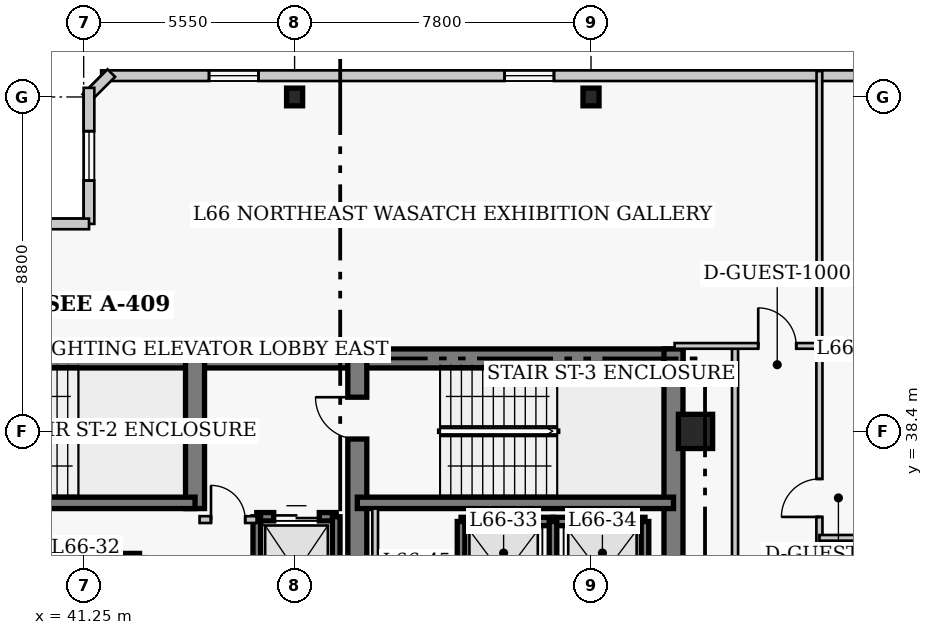
"""IFC4 building model, lengths in metres.
Left out: names, types, materials, properties, quantities, classifications, styles, units other than length and angle.
Written with IfcOpenShell. Run it as: python <this file> out.ifc"""

import sys

from ifc_helpers import new_model, si_unit, direction, frame, frame_2d, origin, origin_2d, place, context, subcontext, project, spatial, rectangle, i_section, extrude, element, fill, save


model = new_model("IFC4")
c1 = context("Model", 3, precision=1e-05, world=origin(), true_north=direction((0.0, 1.0)))
c2 = subcontext(c1, "Body", "Model", "MODEL_VIEW")
j1 = project(units=[si_unit("LENGTHUNIT", "METRE"), si_unit("PLANEANGLEUNIT", "RADIAN")], contexts=[c1])
p1 = place(None, origin())
s1 = spatial("IfcSite", under=j1, at=p1, CompositionType="ELEMENT")
p2 = place(p1, origin())
s2 = spatial("IfcBuilding", under=s1, at=p2, CompositionType="ELEMENT")
p3 = place(p2, frame((0.0, 0.0, 265.4)))
s3 = spatial("IfcBuildingStorey", under=s2, at=p3, CompositionType="ELEMENT", Elevation=265.4)
p4 = place(p3, frame((35.85, 40.32, 0.0), z_axis=(0.0, 0.0, 1.0), x_axis=(1.0, 0.0, 0.0)))
e1 = element("IfcWall", 1, at=p4, inside=s3, PredefinedType="SHEAR", context=c2, shape_type="SweptSolid", body=[
    extrude(rectangle(XDim=12.6, YDim=0.5, at=frame_2d((6.3, 0.0))), origin(), (0.0, 0.0, 1.0), 4.0),
])
p5 = place(p3, frame((48.45, 40.32, 0.0), z_axis=(0.0, 0.0, 1.0), x_axis=(1.0, 0.0, 0.0)))
e2 = element("IfcWall", 2, at=p5, inside=s3, PredefinedType="SHEAR", context=c2, shape_type="SweptSolid", body=[
    extrude(rectangle(XDim=8.57, YDim=0.5, at=frame_2d((4.285, 0.0))), origin(), (0.0, 0.0, 1.0), 4.0),
])
p6 = place(p3, frame((56.77, 27.05, 0.0), z_axis=(0.0, 0.0, 1.0), x_axis=(0.0, 1.0, 0.0)))
e3 = element("IfcWall", 3, at=p6, inside=s3, PredefinedType="SHEAR", context=c2, shape_type="SweptSolid", body=[
    extrude(rectangle(XDim=13.52, YDim=0.5, at=frame_2d((6.76, 0.0))), origin(), (0.0, 0.0, 1.0), 4.0),
])
p7 = place(p3, frame((44.18, 36.37, 0.0), z_axis=(0.0, 0.0, 1.0), x_axis=(0.0, 1.0, 0.0)))
e4 = element("IfcWall", 4, at=p7, inside=s3, PredefinedType="SHEAR", context=c2, shape_type="SweptSolid", body=[
    extrude(rectangle(XDim=3.95, YDim=0.5, at=frame_2d((1.975, 0.0))), origin(), (0.0, 0.0, 1.0), 4.0),
])
p8 = place(p3, frame((48.45, 32.5, 0.0), z_axis=(0.0, 0.0, 1.0), x_axis=(0.0, 1.0, 0.0)))
e5 = element("IfcWall", 5, at=p8, inside=s3, PredefinedType="SHEAR", context=c2, shape_type="SweptSolid", body=[
    extrude(rectangle(XDim=7.82, YDim=0.5, at=frame_2d((3.91, 0.0))), origin(), (0.0, 0.0, 1.0), 4.0),
])
p9 = place(p8, frame((5.7, 0.0, 0.0)))
e6 = element("IfcOpeningElement", 6, at=p9, cuts=e5, PredefinedType="OPENING", context=c2, shape_type="SweptSolid", body=[
    extrude(rectangle(XDim=1.1, YDim=2.15, at=frame_2d((0.55, 1.075))), frame((0.0, 0.26, 0.0), z_axis=(0.0, -1.0, 0.0), x_axis=(1.0, 0.0, 0.0)), (0.0, 0.0, 1.0), 0.52),
])
p10 = place(p3, frame((35.85, 36.52, 0.0), z_axis=(0.0, 0.0, 1.0), x_axis=(1.0, 0.0, 0.0)))
e7 = element("IfcWall", 7, at=p10, inside=s3, PredefinedType="SHEAR", context=c2, shape_type="SweptSolid", body=[
    extrude(rectangle(XDim=8.33, YDim=0.3, at=frame_2d((4.165, 0.0))), origin(), (0.0, 0.0, 1.0), 4.0),
])
p11 = place(p3, frame((48.45, 36.52, 0.0), z_axis=(0.0, 0.0, 1.0), x_axis=(1.0, 0.0, 0.0)))
e8 = element("IfcWall", 8, at=p11, inside=s3, PredefinedType="SHEAR", context=c2, shape_type="SweptSolid", body=[
    extrude(rectangle(XDim=8.32, YDim=0.3, at=frame_2d((4.16, 0.0))), origin(), (0.0, 0.0, 1.0), 4.0),
])
for number, where, z_axis, x_axis in (
    (9, (46.8, 47.2, 0.0), (0.0, 0.0, 1.0), (1.0, 0.0, 0.0)),
    (10, (54.6, 47.2, 0.0), (0.0, 0.0, 1.0), (1.0, 0.0, 0.0)),
):
    element("IfcColumn", number, at=place(p3, frame(where, z_axis=z_axis, x_axis=x_axis)), inside=s3, PredefinedType="COLUMN", context=c2, shape_type="SweptSolid", body=[
        extrude(i_section(OverallWidth=0.422, OverallDepth=0.465, WebThickness=0.045, FlangeThickness=0.073, FilletRadius=0.017, at=origin_2d()), origin(), (0.0, 0.0, 1.0), 4.0),
    ])
p12 = place(p3, frame((57.35, 38.4, 0.0), z_axis=(0.0, 0.0, 1.0), x_axis=(1.0, 0.0, 0.0)))
e11 = element("IfcColumn", 11, at=p12, inside=s3, PredefinedType="COLUMN", context=c2, shape_type="SweptSolid", body=[
    extrude(rectangle(XDim=0.9, YDim=0.9, at=origin_2d()), origin(), (0.0, 0.0, 1.0), 4.0),
])
p13 = place(p3, frame((66.54, 47.76, 0.0), z_axis=(0.0, 0.0, 1.0), x_axis=(-1.0, 0.0, 0.0)))
e12 = element("IfcWall", 12, at=p13, inside=s3, PredefinedType="SOLIDWALL", context=c2, shape_type="SweptSolid", body=[
    extrude(rectangle(XDim=24.83, YDim=0.28, at=frame_2d((12.415, 0.0))), origin(), (0.0, 0.0, 1.0), 3.76),
])
p14 = place(p13, frame((3.488, 0.0, 0.85)))
e13 = element("IfcOpeningElement", 13, at=p14, cuts=e12, PredefinedType="OPENING", context=c2, shape_type="SweptSolid", body=[
    extrude(rectangle(XDim=1.3, YDim=1.7, at=frame_2d((0.65, 0.85))), frame((0.0, 0.15, 0.0), z_axis=(0.0, -1.0, 0.0), x_axis=(1.0, 0.0, 0.0)), (0.0, 0.0, 1.0), 0.3),
])
p15 = place(p13, frame((12.915, 0.0, 0.85)))
e14 = element("IfcOpeningElement", 14, at=p15, cuts=e12, PredefinedType="OPENING", context=c2, shape_type="SweptSolid", body=[
    extrude(rectangle(XDim=1.3, YDim=1.7, at=frame_2d((0.65, 0.85))), frame((0.0, 0.15, 0.0), z_axis=(0.0, -1.0, 0.0), x_axis=(1.0, 0.0, 0.0)), (0.0, 0.0, 1.0), 0.3),
])
p16 = place(p13, frame((20.692, 0.0, 0.85)))
e15 = element("IfcOpeningElement", 15, at=p16, cuts=e12, PredefinedType="OPENING", context=c2, shape_type="SweptSolid", body=[
    extrude(rectangle(XDim=1.3, YDim=1.7, at=frame_2d((0.65, 0.85))), frame((0.0, 0.15, 0.0), z_axis=(0.0, -1.0, 0.0), x_axis=(1.0, 0.0, 0.0)), (0.0, 0.0, 1.0), 0.3),
])
p17 = place(p3, frame((41.977, 47.829, 0.0), z_axis=(0.0, 0.0, 1.0), x_axis=(-0.706975312048, -0.707238225886, 0.0)))
e16 = element("IfcWall", 16, at=p17, inside=s3, PredefinedType="SOLIDWALL", context=c2, shape_type="SweptSolid", body=[
    extrude(rectangle(XDim=0.929, YDim=0.28, at=frame_2d((0.464, 0.0))), origin(), (0.0, 0.0, 1.0), 3.76),
])
p18 = place(p3, frame((41.39, 47.44, 0.0), z_axis=(0.0, 0.0, 1.0), x_axis=(0.0, -1.0, 0.0)))
e17 = element("IfcWall", 17, at=p18, inside=s3, PredefinedType="SOLIDWALL", context=c2, shape_type="SweptSolid", body=[
    extrude(rectangle(XDim=3.58, YDim=0.28, at=frame_2d((1.79, 0.0))), origin(), (0.0, 0.0, 1.0), 3.76),
])
p19 = place(p18, frame((1.14, 0.0, 0.85)))
e18 = element("IfcOpeningElement", 18, at=p19, cuts=e17, PredefinedType="OPENING", context=c2, shape_type="SweptSolid", body=[
    extrude(rectangle(XDim=1.3, YDim=1.7, at=frame_2d((0.65, 0.85))), frame((0.0, 0.15, 0.0), z_axis=(0.0, -1.0, 0.0), x_axis=(1.0, 0.0, 0.0)), (0.0, 0.0, 1.0), 0.3),
])
p20 = place(p3, frame((41.39, 43.86, 0.0), z_axis=(0.0, 0.0, 1.0), x_axis=(-1.0, 0.0, 0.0)))
e19 = element("IfcWall", 19, at=p20, inside=s3, PredefinedType="SOLIDWALL", context=c2, shape_type="SweptSolid", body=[
    extrude(rectangle(XDim=4.78, YDim=0.28, at=frame_2d((2.39, 0.0))), origin(), (0.0, 0.0, 1.0), 3.76),
])
p21 = place(p20, frame((1.74, 0.0, 0.85)))
e20 = element("IfcOpeningElement", 20, at=p21, cuts=e19, PredefinedType="OPENING", context=c2, shape_type="SweptSolid", body=[
    extrude(rectangle(XDim=1.3, YDim=1.7, at=frame_2d((0.65, 0.85))), frame((0.0, 0.15, 0.0), z_axis=(0.0, -1.0, 0.0), x_axis=(1.0, 0.0, 0.0)), (0.0, 0.0, 1.0), 0.3),
])
p22 = place(p3, frame((40.4, 35.08, 0.0), z_axis=(0.0, 0.0, 1.0), x_axis=(1.0, 0.0, 0.0)))
e21 = element("IfcWall", 21, at=p22, inside=s3, PredefinedType="SHEAR", context=c2, shape_type="SweptSolid", body=[
    extrude(rectangle(XDim=2.32, YDim=0.22, at=frame_2d((1.16, 0.0))), origin(), (0.0, 0.0, 1.0), 4.0),
])
p23 = place(p3, frame((51.18, 36.03, 0.0), z_axis=(0.0, 0.0, 1.0), x_axis=(1.0, 0.0, 0.0)))
e22 = element("IfcWall", 22, at=p23, inside=s3, PredefinedType="SHEAR", context=c2, shape_type="SweptSolid", body=[
    extrude(rectangle(XDim=2.42, YDim=0.22, at=frame_2d((1.21, 0.0))), origin(), (0.0, 0.0, 1.0), 4.0),
])
p24 = place(p3, frame((51.18, 33.17, 0.0), z_axis=(0.0, 0.0, 1.0), x_axis=(0.0, 1.0, 0.0)))
e23 = element("IfcWall", 23, at=p24, inside=s3, PredefinedType="SHEAR", context=c2, shape_type="SweptSolid", body=[
    extrude(rectangle(XDim=2.86, YDim=0.2, at=frame_2d((1.43, 0.0))), origin(), (0.0, 0.0, 1.0), 4.0),
])
p25 = place(p3, frame((53.6, 36.03, 0.0), z_axis=(0.0, 0.0, 1.0), x_axis=(1.0, 0.0, 0.0)))
e24 = element("IfcWall", 24, at=p25, inside=s3, PredefinedType="SHEAR", context=c2, shape_type="SweptSolid", body=[
    extrude(rectangle(XDim=2.42, YDim=0.22, at=frame_2d((1.21, 0.0))), origin(), (0.0, 0.0, 1.0), 4.0),
])
for number, where, z_axis, x_axis in (
    (25, (53.6, 33.17, 0.0), (0.0, 0.0, 1.0), (0.0, 1.0, 0.0)),
    (26, (56.02, 33.17, 0.0), (0.0, 0.0, 1.0), (0.0, 1.0, 0.0)),
):
    element("IfcWall", number, at=place(p3, frame(where, z_axis=z_axis, x_axis=x_axis)), inside=s3, PredefinedType="SHEAR", context=c2, shape_type="SweptSolid", body=[
        extrude(rectangle(XDim=2.86, YDim=0.2, at=frame_2d((1.43, 0.0))), origin(), (0.0, 0.0, 1.0), 4.0),
    ])
p26 = place(p3, frame((45.805, 36.155, 0.0), z_axis=(0.0, 0.0, 1.0), x_axis=(1.0, 0.0, 0.0)))
e27 = element("IfcWall", 27, at=p26, inside=s3, PredefinedType="SHEAR", context=c2, shape_type="SweptSolid", body=[
    extrude(rectangle(XDim=2.09, YDim=0.22, at=frame_2d((1.045, 0.0))), origin(), (0.0, 0.0, 1.0), 4.0),
])
p27 = place(p26, frame((0.445, 0.0, 0.0)))
e28 = element("IfcOpeningElement", 28, at=p27, cuts=e27, PredefinedType="OPENING", context=c2, shape_type="SweptSolid", body=[
    extrude(rectangle(XDim=1.2, YDim=2.15, at=frame_2d((0.6, 1.075))), frame((0.0, 0.12, 0.0), z_axis=(0.0, -1.0, 0.0), x_axis=(1.0, 0.0, 0.0)), (0.0, 0.0, 1.0), 0.24),
])
p28 = place(p3, frame((45.805, 32.65, 0.0), z_axis=(0.0, 0.0, 1.0), x_axis=(0.0, 1.0, 0.0)))
e29 = element("IfcWall", 29, at=p28, inside=s3, PredefinedType="SHEAR", context=c2, shape_type="SweptSolid", body=[
    extrude(rectangle(XDim=3.505, YDim=0.2, at=frame_2d((1.752, 0.0))), origin(), (0.0, 0.0, 1.0), 4.0),
])
p29 = place(p3, frame((47.895, 33.245, 0.0), z_axis=(0.0, 0.0, 1.0), x_axis=(0.0, 1.0, 0.0)))
e30 = element("IfcWall", 30, at=p29, inside=s3, PredefinedType="SHEAR", context=c2, shape_type="SweptSolid", body=[
    extrude(rectangle(XDim=2.91, YDim=0.2, at=frame_2d((1.455, 0.0))), origin(), (0.0, 0.0, 1.0), 4.0),
])
p30 = place(p3, frame((44.3, 36.08, 0.0), z_axis=(0.0, 0.0, 1.0), x_axis=(1.0, 0.0, 0.0)))
e31 = element("IfcWall", 31, at=p30, inside=s3, PredefinedType="PARTITIONING", context=c2, shape_type="SweptSolid", body=[
    extrude(rectangle(XDim=1.5, YDim=0.18, at=frame_2d((0.75, 0.0))), origin(), (0.0, 0.0, 1.0), 3.76),
])
p31 = place(p30, frame((0.3, 0.0, 0.0)))
e32 = element("IfcOpeningElement", 32, at=p31, cuts=e31, PredefinedType="OPENING", context=c2, shape_type="SweptSolid", body=[
    extrude(rectangle(XDim=0.9, YDim=2.15, at=frame_2d((0.45, 1.075))), frame((0.0, 0.1, 0.0), z_axis=(0.0, -1.0, 0.0), x_axis=(1.0, 0.0, 0.0)), (0.0, 0.0, 1.0), 0.2),
])
p32 = place(p3, frame((48.92, 32.75, 0.0), z_axis=(0.0, 0.0, 1.0), x_axis=(0.0, 1.0, 0.0)))
e33 = element("IfcWall", 33, at=p32, inside=s3, PredefinedType="PARTITIONING", context=c2, shape_type="SweptSolid", body=[
    extrude(rectangle(XDim=3.62, YDim=0.15, at=frame_2d((1.81, 0.0))), origin(), (0.0, 0.0, 1.0), 3.76),
])
p33 = place(p3, frame((60.61, 24.25, 0.0), z_axis=(0.0, 0.0, 1.0), x_axis=(0.0, 1.0, 0.0)))
e34 = element("IfcWall", 34, at=p33, inside=s3, PredefinedType="PARTITIONING", context=c2, shape_type="SweptSolid", body=[
    extrude(rectangle(XDim=16.4, YDim=0.16, at=frame_2d((8.2, 0.0))), origin(), (0.0, 0.0, 1.0), 3.76),
])
p34 = place(p33, frame((0.46, 0.0, 0.0)))
e35 = element("IfcOpeningElement", 35, at=p34, cuts=e34, PredefinedType="OPENING", context=c2, shape_type="SweptSolid", body=[
    extrude(rectangle(XDim=0.95, YDim=2.1, at=frame_2d((0.475, 1.05))), frame((0.0, 0.09, 0.0), z_axis=(0.0, -1.0, 0.0), x_axis=(1.0, 0.0, 0.0)), (0.0, 0.0, 1.0), 0.18),
])
p35 = place(p33, frame((11.9, 0.0, 0.0)))
e36 = element("IfcOpeningElement", 36, at=p35, cuts=e34, PredefinedType="OPENING", context=c2, shape_type="SweptSolid", body=[
    extrude(rectangle(XDim=1.0, YDim=2.15, at=frame_2d((0.5, 1.075))), frame((0.0, 0.09, 0.0), z_axis=(0.0, -1.0, 0.0), x_axis=(1.0, 0.0, 0.0)), (0.0, 0.0, 1.0), 0.18),
])
p36 = place(p3, frame((58.39, 26.41, 0.0), z_axis=(0.0, 0.0, 1.0), x_axis=(0.0, 1.0, 0.0)))
e37 = element("IfcWall", 37, at=p36, inside=s3, PredefinedType="PARTITIONING", context=c2, shape_type="SweptSolid", body=[
    extrude(rectangle(XDim=14.24, YDim=0.16, at=frame_2d((7.12, 0.0))), origin(), (0.0, 0.0, 1.0), 3.76),
])
p37 = place(p3, frame((56.8, 40.65, 0.0), z_axis=(0.0, 0.0, 1.0), x_axis=(1.0, 0.0, 0.0)))
e38 = element("IfcWall", 38, at=p37, inside=s3, PredefinedType="PARTITIONING", context=c2, shape_type="SweptSolid", body=[
    extrude(rectangle(XDim=3.81, YDim=0.15, at=frame_2d((1.905, 0.0))), origin(), (0.0, 0.0, 1.0), 3.76),
])
p38 = place(p37, frame((2.2, 0.0, 0.0)))
e39 = element("IfcOpeningElement", 39, at=p38, cuts=e38, PredefinedType="OPENING", context=c2, shape_type="SweptSolid", body=[
    extrude(rectangle(XDim=1.0, YDim=2.15, at=frame_2d((0.5, 1.075))), frame((0.0, 0.085, 0.0), z_axis=(0.0, -1.0, 0.0), x_axis=(1.0, 0.0, 0.0)), (0.0, 0.0, 1.0), 0.17),
])
p39 = place(p3, frame((60.61, 40.65, 0.0), z_axis=(0.0, 0.0, 1.0), x_axis=(0.0, 1.0, 0.0)))
e40 = element("IfcWall", 40, at=p39, inside=s3, PredefinedType="PARTITIONING", context=c2, shape_type="SweptSolid", body=[
    extrude(rectangle(XDim=7.23, YDim=0.15, at=frame_2d((3.615, 0.0))), origin(), (0.0, 0.0, 1.0), 3.76),
])
p40 = place(p3, frame((60.61, 35.6, 0.0), z_axis=(0.0, 0.0, 1.0), x_axis=(1.0, 0.0, 0.0)))
e41 = element("IfcWall", 41, at=p40, inside=s3, PredefinedType="PARTITIONING", context=c2, shape_type="SweptSolid", body=[
    extrude(rectangle(XDim=4.49, YDim=0.15, at=frame_2d((2.245, 0.0))), origin(), (0.0, 0.0, 1.0), 3.76),
])
p41 = place(p15, origin())
e42 = element("IfcWindow", 42, at=p41, inside=s3, PartitioningType="SINGLE_PANEL", PredefinedType="WINDOW", context=c2, shape_type="SweptSolid", body=[
    extrude(rectangle(XDim=1.3, YDim=1.7, at=frame_2d((0.65, 0.85))), frame((0.0, 0.03, 0.0), z_axis=(0.0, -1.0, 0.0), x_axis=(1.0, 0.0, 0.0)), (0.0, 0.0, 1.0), 0.06),
])
fill(e14, e42)
p42 = place(p16, origin())
e43 = element("IfcWindow", 43, at=p42, inside=s3, PartitioningType="SINGLE_PANEL", PredefinedType="WINDOW", context=c2, shape_type="SweptSolid", body=[
    extrude(rectangle(XDim=1.3, YDim=1.7, at=frame_2d((0.65, 0.85))), frame((0.0, 0.03, 0.0), z_axis=(0.0, -1.0, 0.0), x_axis=(1.0, 0.0, 0.0)), (0.0, 0.0, 1.0), 0.06),
])
fill(e15, e43)
p43 = place(p19, origin())
e44 = element("IfcWindow", 44, at=p43, inside=s3, PartitioningType="SINGLE_PANEL", PredefinedType="WINDOW", context=c2, shape_type="SweptSolid", body=[
    extrude(rectangle(XDim=1.3, YDim=1.7, at=frame_2d((0.65, 0.85))), frame((0.0, 0.03, 0.0), z_axis=(0.0, -1.0, 0.0), x_axis=(1.0, 0.0, 0.0)), (0.0, 0.0, 1.0), 0.06),
])
fill(e18, e44)
p44 = place(p27, origin())
e45 = element("IfcDoor", 45, at=p44, inside=s3, OperationType="DOUBLE_DOOR_SLIDING", PredefinedType="DOOR", context=c2, shape_type="SweptSolid", body=[
    extrude(rectangle(XDim=1.2, YDim=2.15, at=frame_2d((0.6, 1.075))), frame((0.0, 0.025, 0.0), z_axis=(0.0, -1.0, 0.0), x_axis=(1.0, 0.0, 0.0)), (0.0, 0.0, 1.0), 0.05),
])
fill(e28, e45)
p45 = place(p31, origin())
e46 = element("IfcDoor", 46, at=p45, inside=s3, OperationType="SINGLE_SWING_LEFT", PredefinedType="DOOR", context=c2, shape_type="SweptSolid", body=[
    extrude(rectangle(XDim=0.9, YDim=2.15, at=frame_2d((0.45, 1.075))), frame((0.0, 0.025, 0.0), z_axis=(0.0, -1.0, 0.0), x_axis=(1.0, 0.0, 0.0)), (0.0, 0.0, 1.0), 0.05),
])
fill(e32, e46)
p46 = place(p38, origin())
e47 = element("IfcDoor", 47, at=p46, inside=s3, OperationType="SINGLE_SWING_LEFT", PredefinedType="DOOR", context=c2, shape_type="SweptSolid", body=[
    extrude(rectangle(XDim=1.0, YDim=2.15, at=frame_2d((0.5, 1.075))), frame((0.0, 0.025, 0.0), z_axis=(0.0, -1.0, 0.0), x_axis=(1.0, 0.0, 0.0)), (0.0, 0.0, 1.0), 0.05),
])
fill(e39, e47)
p47 = place(p35, origin())
e48 = element("IfcDoor", 48, at=p47, inside=s3, OperationType="SINGLE_SWING_LEFT", PredefinedType="DOOR", context=c2, shape_type="SweptSolid", body=[
    extrude(rectangle(XDim=1.0, YDim=2.15, at=frame_2d((0.5, 1.075))), frame((0.0, 0.025, 0.0), z_axis=(0.0, -1.0, 0.0), x_axis=(1.0, 0.0, 0.0)), (0.0, 0.0, 1.0), 0.05),
])
fill(e36, e48)
p48 = place(p9, origin())
e49 = element("IfcDoor", 49, at=p48, inside=s3, OperationType="SINGLE_SWING_RIGHT", PredefinedType="DOOR", context=c2, shape_type="SweptSolid", body=[
    extrude(rectangle(XDim=1.1, YDim=2.15, at=frame_2d((0.55, 1.075))), frame((0.0, 0.025, 0.0), z_axis=(0.0, -1.0, 0.0), x_axis=(1.0, 0.0, 0.0)), (0.0, 0.0, 1.0), 0.05),
])
fill(e6, e49)
save(model, sys.argv[1])
